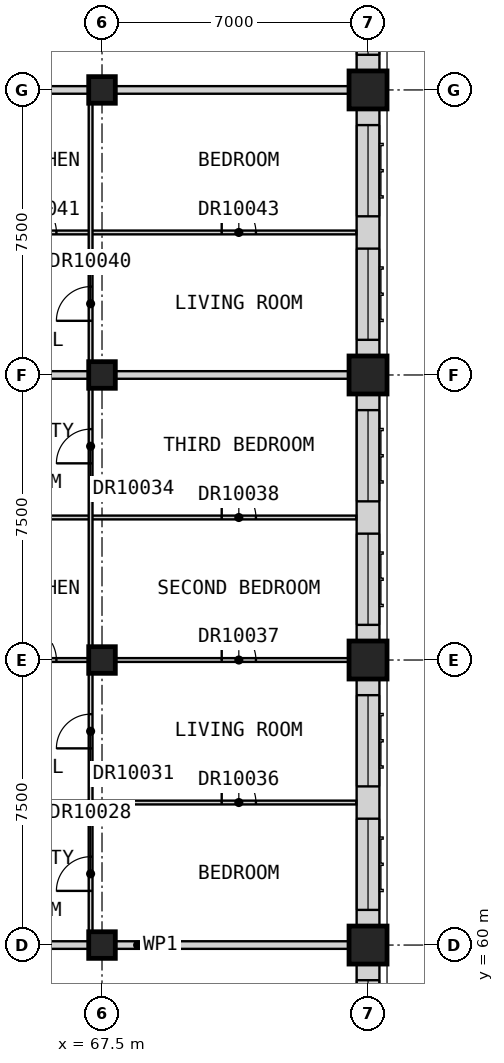
"""IFC4 building model, lengths in metres.
Left out: names, types, materials, properties, quantities, classifications, styles, units other than length and angle.
Written with IfcOpenShell. Run it as: python <this file> out.ifc"""

import sys

from ifc_helpers import new_model, si_unit, direction, frame, frame_2d, origin, origin_2d, place, context, subcontext, project, spatial, rectangle, extrude, element, fill, save


model = new_model("IFC4")
c1 = context("Model", 3, precision=1e-05, world=origin(), true_north=direction((0.0, 1.0)))
c2 = subcontext(c1, "Body", "Model", "MODEL_VIEW")
j1 = project(units=[si_unit("LENGTHUNIT", "METRE"), si_unit("PLANEANGLEUNIT", "RADIAN")], contexts=[c1])
p1 = place(None, origin())
s1 = spatial("IfcSite", under=j1, at=p1, CompositionType="ELEMENT")
p2 = place(p1, origin())
s2 = spatial("IfcBuilding", under=s1, at=p2, CompositionType="ELEMENT")
p3 = place(p2, frame((0.0, 0.0, 273.2)))
s3 = spatial("IfcBuildingStorey", under=s2, at=p3, CompositionType="ELEMENT", Elevation=273.2)
for number, where, z_axis, x_axis in (
    (1, (67.5, 60.0, 0.0), (0.0, 0.0, 1.0), (1.0, 0.0, 0.0)),
    (2, (67.5, 67.5, 0.0), (0.0, 0.0, 1.0), (1.0, 0.0, 0.0)),
    (3, (67.5, 75.0, 0.0), (0.0, 0.0, 1.0), (1.0, 0.0, 0.0)),
    (4, (67.5, 82.5, 0.0), (0.0, 0.0, 1.0), (1.0, 0.0, 0.0)),
):
    element("IfcColumn", number, at=place(p3, frame(where, z_axis=z_axis, x_axis=x_axis)), inside=s3, PredefinedType="COLUMN", context=c2, shape_type="SweptSolid", body=[
        extrude(rectangle(XDim=0.7, YDim=0.7, at=origin_2d()), origin(), (0.0, 0.0, 1.0), 3.5),
    ])
for number, where, z_axis, x_axis in (
    (5, (74.5, 60.0, 0.0), (0.0, 0.0, 1.0), (1.0, 0.0, 0.0)),
    (6, (74.5, 67.5, 0.0), (0.0, 0.0, 1.0), (1.0, 0.0, 0.0)),
    (7, (74.5, 75.0, 0.0), (0.0, 0.0, 1.0), (1.0, 0.0, 0.0)),
    (8, (74.5, 82.5, 0.0), (0.0, 0.0, 1.0), (1.0, 0.0, 0.0)),
):
    element("IfcColumn", number, at=place(p3, frame(where, z_axis=z_axis, x_axis=x_axis)), inside=s3, PredefinedType="COLUMN", context=c2, shape_type="SweptSolid", body=[
        extrude(rectangle(XDim=1.0, YDim=1.0, at=origin_2d()), origin(), (0.0, 0.0, 1.0), 3.5),
    ])
p4 = place(p3, frame((74.5, 53.0, 0.0), z_axis=(0.0, 0.0, 1.0), x_axis=(0.0, 1.0, 0.0)))
e9 = element("IfcWall", 9, at=p4, inside=s3, PredefinedType="SOLIDWALL", context=c2, shape_type="SweptSolid", body=[
    extrude(rectangle(XDim=6.5, YDim=0.6, at=frame_2d((3.25, 0.0))), origin(), (0.0, 0.0, 1.0), 2.75),
])
p5 = place(p4, frame((0.425, 0.0, 0.8)))
e10 = element("IfcOpeningElement", 10, at=p5, cuts=e9, PredefinedType="OPENING", context=c2, shape_type="SweptSolid", body=[
    extrude(rectangle(XDim=2.4, YDim=1.8, at=frame_2d((1.2, 0.9))), frame((0.0, 0.31, 0.0), z_axis=(0.0, -1.0, 0.0), x_axis=(1.0, 0.0, 0.0)), (0.0, 0.0, 1.0), 0.62),
])
p6 = place(p4, frame((3.675, 0.0, 0.8)))
e11 = element("IfcOpeningElement", 11, at=p6, cuts=e9, PredefinedType="OPENING", context=c2, shape_type="SweptSolid", body=[
    extrude(rectangle(XDim=2.4, YDim=1.8, at=frame_2d((1.2, 0.9))), frame((0.0, 0.31, 0.0), z_axis=(0.0, -1.0, 0.0), x_axis=(1.0, 0.0, 0.0)), (0.0, 0.0, 1.0), 0.62),
])
p7 = place(p3, frame((74.5, 60.5, 0.0), z_axis=(0.0, 0.0, 1.0), x_axis=(0.0, 1.0, 0.0)))
e12 = element("IfcWall", 12, at=p7, inside=s3, PredefinedType="SOLIDWALL", context=c2, shape_type="SweptSolid", body=[
    extrude(rectangle(XDim=6.5, YDim=0.6, at=frame_2d((3.25, 0.0))), origin(), (0.0, 0.0, 1.0), 2.75),
])
p8 = place(p7, frame((0.425, 0.0, 0.8)))
e13 = element("IfcOpeningElement", 13, at=p8, cuts=e12, PredefinedType="OPENING", context=c2, shape_type="SweptSolid", body=[
    extrude(rectangle(XDim=2.4, YDim=1.8, at=frame_2d((1.2, 0.9))), frame((0.0, 0.31, 0.0), z_axis=(0.0, -1.0, 0.0), x_axis=(1.0, 0.0, 0.0)), (0.0, 0.0, 1.0), 0.62),
])
p9 = place(p7, frame((3.675, 0.0, 0.8)))
e14 = element("IfcOpeningElement", 14, at=p9, cuts=e12, PredefinedType="OPENING", context=c2, shape_type="SweptSolid", body=[
    extrude(rectangle(XDim=2.4, YDim=1.8, at=frame_2d((1.2, 0.9))), frame((0.0, 0.31, 0.0), z_axis=(0.0, -1.0, 0.0), x_axis=(1.0, 0.0, 0.0)), (0.0, 0.0, 1.0), 0.62),
])
p10 = place(p3, frame((74.5, 68.0, 0.0), z_axis=(0.0, 0.0, 1.0), x_axis=(0.0, 1.0, 0.0)))
e15 = element("IfcWall", 15, at=p10, inside=s3, PredefinedType="SOLIDWALL", context=c2, shape_type="SweptSolid", body=[
    extrude(rectangle(XDim=6.5, YDim=0.6, at=frame_2d((3.25, 0.0))), origin(), (0.0, 0.0, 1.0), 2.75),
])
p11 = place(p10, frame((0.425, 0.0, 0.8)))
e16 = element("IfcOpeningElement", 16, at=p11, cuts=e15, PredefinedType="OPENING", context=c2, shape_type="SweptSolid", body=[
    extrude(rectangle(XDim=2.4, YDim=1.8, at=frame_2d((1.2, 0.9))), frame((0.0, 0.31, 0.0), z_axis=(0.0, -1.0, 0.0), x_axis=(1.0, 0.0, 0.0)), (0.0, 0.0, 1.0), 0.62),
])
p12 = place(p10, frame((3.675, 0.0, 0.8)))
e17 = element("IfcOpeningElement", 17, at=p12, cuts=e15, PredefinedType="OPENING", context=c2, shape_type="SweptSolid", body=[
    extrude(rectangle(XDim=2.4, YDim=1.8, at=frame_2d((1.2, 0.9))), frame((0.0, 0.31, 0.0), z_axis=(0.0, -1.0, 0.0), x_axis=(1.0, 0.0, 0.0)), (0.0, 0.0, 1.0), 0.62),
])
p13 = place(p3, frame((74.5, 75.5, 0.0), z_axis=(0.0, 0.0, 1.0), x_axis=(0.0, 1.0, 0.0)))
e18 = element("IfcWall", 18, at=p13, inside=s3, PredefinedType="SOLIDWALL", context=c2, shape_type="SweptSolid", body=[
    extrude(rectangle(XDim=6.5, YDim=0.6, at=frame_2d((3.25, 0.0))), origin(), (0.0, 0.0, 1.0), 2.75),
])
p14 = place(p13, frame((0.425, 0.0, 0.8)))
e19 = element("IfcOpeningElement", 19, at=p14, cuts=e18, PredefinedType="OPENING", context=c2, shape_type="SweptSolid", body=[
    extrude(rectangle(XDim=2.4, YDim=1.8, at=frame_2d((1.2, 0.9))), frame((0.0, 0.31, 0.0), z_axis=(0.0, -1.0, 0.0), x_axis=(1.0, 0.0, 0.0)), (0.0, 0.0, 1.0), 0.62),
])
p15 = place(p13, frame((3.675, 0.0, 0.8)))
e20 = element("IfcOpeningElement", 20, at=p15, cuts=e18, PredefinedType="OPENING", context=c2, shape_type="SweptSolid", body=[
    extrude(rectangle(XDim=2.4, YDim=1.8, at=frame_2d((1.2, 0.9))), frame((0.0, 0.31, 0.0), z_axis=(0.0, -1.0, 0.0), x_axis=(1.0, 0.0, 0.0)), (0.0, 0.0, 1.0), 0.62),
])
p16 = place(p3, frame((74.5, 83.0, 0.0), z_axis=(0.0, 0.0, 1.0), x_axis=(0.0, 1.0, 0.0)))
e21 = element("IfcWall", 21, at=p16, inside=s3, PredefinedType="SOLIDWALL", context=c2, shape_type="SweptSolid", body=[
    extrude(rectangle(XDim=6.5, YDim=0.6, at=frame_2d((3.25, 0.0))), origin(), (0.0, 0.0, 1.0), 2.75),
])
p17 = place(p16, frame((0.425, 0.0, 0.8)))
e22 = element("IfcOpeningElement", 22, at=p17, cuts=e21, PredefinedType="OPENING", context=c2, shape_type="SweptSolid", body=[
    extrude(rectangle(XDim=2.4, YDim=1.8, at=frame_2d((1.2, 0.9))), frame((0.0, 0.31, 0.0), z_axis=(0.0, -1.0, 0.0), x_axis=(1.0, 0.0, 0.0)), (0.0, 0.0, 1.0), 0.62),
])
p18 = place(p16, frame((3.675, 0.0, 0.8)))
e23 = element("IfcOpeningElement", 23, at=p18, cuts=e21, PredefinedType="OPENING", context=c2, shape_type="SweptSolid", body=[
    extrude(rectangle(XDim=2.4, YDim=1.8, at=frame_2d((1.2, 0.9))), frame((0.0, 0.31, 0.0), z_axis=(0.0, -1.0, 0.0), x_axis=(1.0, 0.0, 0.0)), (0.0, 0.0, 1.0), 0.62),
])
for number, where, z_axis, x_axis in (
    (24, (61.875, 60.0, 0.0), (0.0, 0.0, 1.0), (1.0, 0.0, 0.0)),
    (25, (61.875, 75.0, 0.0), (0.0, 0.0, 1.0), (1.0, 0.0, 0.0)),
    (26, (61.875, 82.5, 0.0), (0.0, 0.0, 1.0), (1.0, 0.0, 0.0)),
):
    element("IfcWall", number, at=place(p3, frame(where, z_axis=z_axis, x_axis=x_axis)), inside=s3, PredefinedType="PARTITIONING", context=c2, shape_type="SweptSolid", body=[
        extrude(rectangle(XDim=13.125, YDim=0.2, at=frame_2d((6.562, 0.0))), origin(), (0.0, 0.0, 1.0), 3.25),
    ])
p19 = place(p3, frame((64.562, 63.75, 0.0), z_axis=(0.0, 0.0, 1.0), x_axis=(1.0, 0.0, 0.0)))
e27 = element("IfcWall", 27, at=p19, inside=s3, PredefinedType="PARTITIONING", context=c2, shape_type="SweptSolid", body=[
    extrude(rectangle(XDim=9.627, YDim=0.1, at=frame_2d((4.814, 0.0))), origin(), (0.0, 0.0, 1.0), 3.25),
])
p20 = place(p19, frame((6.087, 0.0, 0.0)))
e28 = element("IfcOpeningElement", 28, at=p20, cuts=e27, PredefinedType="OPENING", context=c2, shape_type="SweptSolid", body=[
    extrude(rectangle(XDim=0.9, YDim=2.1, at=frame_2d((0.45, 1.05))), frame((0.0, 0.06, 0.0), z_axis=(0.0, -1.0, 0.0), x_axis=(1.0, 0.0, 0.0)), (0.0, 0.0, 1.0), 0.12),
])
p21 = place(p3, frame((64.562, 67.5, 0.0), z_axis=(0.0, 0.0, 1.0), x_axis=(1.0, 0.0, 0.0)))
e29 = element("IfcWall", 29, at=p21, inside=s3, PredefinedType="PARTITIONING", context=c2, shape_type="SweptSolid", body=[
    extrude(rectangle(XDim=10.438, YDim=0.1, at=frame_2d((5.219, 0.0))), origin(), (0.0, 0.0, 1.0), 3.25),
])
p22 = place(p21, frame((0.837, 0.0, 0.0)))
e30 = element("IfcOpeningElement", 30, at=p22, cuts=e29, PredefinedType="OPENING", context=c2, shape_type="SweptSolid", body=[
    extrude(rectangle(XDim=0.9, YDim=2.1, at=frame_2d((0.45, 1.05))), frame((0.0, 0.06, 0.0), z_axis=(0.0, -1.0, 0.0), x_axis=(1.0, 0.0, 0.0)), (0.0, 0.0, 1.0), 0.12),
])
p23 = place(p21, frame((6.087, 0.0, 0.0)))
e31 = element("IfcOpeningElement", 31, at=p23, cuts=e29, PredefinedType="OPENING", context=c2, shape_type="SweptSolid", body=[
    extrude(rectangle(XDim=0.9, YDim=2.1, at=frame_2d((0.45, 1.05))), frame((0.0, 0.06, 0.0), z_axis=(0.0, -1.0, 0.0), x_axis=(1.0, 0.0, 0.0)), (0.0, 0.0, 1.0), 0.12),
])
p24 = place(p3, frame((64.562, 71.25, 0.0), z_axis=(0.0, 0.0, 1.0), x_axis=(1.0, 0.0, 0.0)))
e32 = element("IfcWall", 32, at=p24, inside=s3, PredefinedType="PARTITIONING", context=c2, shape_type="SweptSolid", body=[
    extrude(rectangle(XDim=9.627, YDim=0.1, at=frame_2d((4.814, 0.0))), origin(), (0.0, 0.0, 1.0), 3.25),
])
p25 = place(p24, frame((6.087, 0.0, 0.0)))
e33 = element("IfcOpeningElement", 33, at=p25, cuts=e32, PredefinedType="OPENING", context=c2, shape_type="SweptSolid", body=[
    extrude(rectangle(XDim=0.9, YDim=2.1, at=frame_2d((0.45, 1.05))), frame((0.0, 0.06, 0.0), z_axis=(0.0, -1.0, 0.0), x_axis=(1.0, 0.0, 0.0)), (0.0, 0.0, 1.0), 0.12),
])
p26 = place(p3, frame((64.562, 78.75, 0.0), z_axis=(0.0, 0.0, 1.0), x_axis=(1.0, 0.0, 0.0)))
e34 = element("IfcWall", 34, at=p26, inside=s3, PredefinedType="PARTITIONING", context=c2, shape_type="SweptSolid", body=[
    extrude(rectangle(XDim=9.627, YDim=0.1, at=frame_2d((4.814, 0.0))), origin(), (0.0, 0.0, 1.0), 3.25),
])
p27 = place(p26, frame((0.837, 0.0, 0.0)))
e35 = element("IfcOpeningElement", 35, at=p27, cuts=e34, PredefinedType="OPENING", context=c2, shape_type="SweptSolid", body=[
    extrude(rectangle(XDim=0.9, YDim=2.1, at=frame_2d((0.45, 1.05))), frame((0.0, 0.06, 0.0), z_axis=(0.0, -1.0, 0.0), x_axis=(1.0, 0.0, 0.0)), (0.0, 0.0, 1.0), 0.12),
])
p28 = place(p26, frame((6.087, 0.0, 0.0)))
e36 = element("IfcOpeningElement", 36, at=p28, cuts=e34, PredefinedType="OPENING", context=c2, shape_type="SweptSolid", body=[
    extrude(rectangle(XDim=0.9, YDim=2.1, at=frame_2d((0.45, 1.05))), frame((0.0, 0.06, 0.0), z_axis=(0.0, -1.0, 0.0), x_axis=(1.0, 0.0, 0.0)), (0.0, 0.0, 1.0), 0.12),
])
p29 = place(p3, frame((67.2, 60.1, 0.0), z_axis=(0.0, 0.0, 1.0), x_axis=(0.0, 1.0, 0.0)))
e37 = element("IfcWall", 37, at=p29, inside=s3, PredefinedType="PARTITIONING", context=c2, shape_type="SweptSolid", body=[
    extrude(rectangle(XDim=22.3, YDim=0.1, at=frame_2d((11.15, 0.0))), origin(), (0.0, 0.0, 1.0), 3.25),
])
p30 = place(p29, frame((1.325, 0.0, 0.0)))
e38 = element("IfcOpeningElement", 38, at=p30, cuts=e37, PredefinedType="OPENING", context=c2, shape_type="SweptSolid", body=[
    extrude(rectangle(XDim=0.9, YDim=2.1, at=frame_2d((0.45, 1.05))), frame((0.0, 0.06, 0.0), z_axis=(0.0, -1.0, 0.0), x_axis=(1.0, 0.0, 0.0)), (0.0, 0.0, 1.0), 0.12),
])
p31 = place(p29, frame((5.075, 0.0, 0.0)))
e39 = element("IfcOpeningElement", 39, at=p31, cuts=e37, PredefinedType="OPENING", context=c2, shape_type="SweptSolid", body=[
    extrude(rectangle(XDim=0.9, YDim=2.1, at=frame_2d((0.45, 1.05))), frame((0.0, 0.06, 0.0), z_axis=(0.0, -1.0, 0.0), x_axis=(1.0, 0.0, 0.0)), (0.0, 0.0, 1.0), 0.12),
])
p32 = place(p29, frame((12.575, 0.0, 0.0)))
e40 = element("IfcOpeningElement", 40, at=p32, cuts=e37, PredefinedType="OPENING", context=c2, shape_type="SweptSolid", body=[
    extrude(rectangle(XDim=0.9, YDim=2.1, at=frame_2d((0.45, 1.05))), frame((0.0, 0.06, 0.0), z_axis=(0.0, -1.0, 0.0), x_axis=(1.0, 0.0, 0.0)), (0.0, 0.0, 1.0), 0.12),
])
p33 = place(p29, frame((16.325, 0.0, 0.0)))
e41 = element("IfcOpeningElement", 41, at=p33, cuts=e37, PredefinedType="OPENING", context=c2, shape_type="SweptSolid", body=[
    extrude(rectangle(XDim=0.9, YDim=2.1, at=frame_2d((0.45, 1.05))), frame((0.0, 0.06, 0.0), z_axis=(0.0, -1.0, 0.0), x_axis=(1.0, 0.0, 0.0)), (0.0, 0.0, 1.0), 0.12),
])
p34 = place(p6, origin())
e42 = element("IfcWindow", 42, at=p34, inside=s3, PartitioningType="SINGLE_PANEL", PredefinedType="WINDOW", context=c2, shape_type="SweptSolid", body=[
    extrude(rectangle(XDim=2.4, YDim=1.8, at=frame_2d((1.2, 0.9))), frame((0.0, -0.07, 0.0), z_axis=(0.0, -1.0, 0.0), x_axis=(1.0, 0.0, 0.0)), (0.0, 0.0, 1.0), 0.06),
])
fill(e11, e42)
p35 = place(p8, origin())
e43 = element("IfcWindow", 43, at=p35, inside=s3, PartitioningType="SINGLE_PANEL", PredefinedType="WINDOW", context=c2, shape_type="SweptSolid", body=[
    extrude(rectangle(XDim=2.4, YDim=1.8, at=frame_2d((1.2, 0.9))), frame((0.0, -0.07, 0.0), z_axis=(0.0, -1.0, 0.0), x_axis=(1.0, 0.0, 0.0)), (0.0, 0.0, 1.0), 0.06),
])
fill(e13, e43)
p36 = place(p9, origin())
e44 = element("IfcWindow", 44, at=p36, inside=s3, PartitioningType="SINGLE_PANEL", PredefinedType="WINDOW", context=c2, shape_type="SweptSolid", body=[
    extrude(rectangle(XDim=2.4, YDim=1.8, at=frame_2d((1.2, 0.9))), frame((0.0, -0.07, 0.0), z_axis=(0.0, -1.0, 0.0), x_axis=(1.0, 0.0, 0.0)), (0.0, 0.0, 1.0), 0.06),
])
fill(e14, e44)
p37 = place(p11, origin())
e45 = element("IfcWindow", 45, at=p37, inside=s3, PartitioningType="SINGLE_PANEL", PredefinedType="WINDOW", context=c2, shape_type="SweptSolid", body=[
    extrude(rectangle(XDim=2.4, YDim=1.8, at=frame_2d((1.2, 0.9))), frame((0.0, -0.07, 0.0), z_axis=(0.0, -1.0, 0.0), x_axis=(1.0, 0.0, 0.0)), (0.0, 0.0, 1.0), 0.06),
])
fill(e16, e45)
p38 = place(p12, origin())
e46 = element("IfcWindow", 46, at=p38, inside=s3, PartitioningType="SINGLE_PANEL", PredefinedType="WINDOW", context=c2, shape_type="SweptSolid", body=[
    extrude(rectangle(XDim=2.4, YDim=1.8, at=frame_2d((1.2, 0.9))), frame((0.0, -0.07, 0.0), z_axis=(0.0, -1.0, 0.0), x_axis=(1.0, 0.0, 0.0)), (0.0, 0.0, 1.0), 0.06),
])
fill(e17, e46)
p39 = place(p14, origin())
e47 = element("IfcWindow", 47, at=p39, inside=s3, PartitioningType="SINGLE_PANEL", PredefinedType="WINDOW", context=c2, shape_type="SweptSolid", body=[
    extrude(rectangle(XDim=2.4, YDim=1.8, at=frame_2d((1.2, 0.9))), frame((0.0, -0.07, 0.0), z_axis=(0.0, -1.0, 0.0), x_axis=(1.0, 0.0, 0.0)), (0.0, 0.0, 1.0), 0.06),
])
fill(e19, e47)
p40 = place(p15, origin())
e48 = element("IfcWindow", 48, at=p40, inside=s3, PartitioningType="SINGLE_PANEL", PredefinedType="WINDOW", context=c2, shape_type="SweptSolid", body=[
    extrude(rectangle(XDim=2.4, YDim=1.8, at=frame_2d((1.2, 0.9))), frame((0.0, -0.07, 0.0), z_axis=(0.0, -1.0, 0.0), x_axis=(1.0, 0.0, 0.0)), (0.0, 0.0, 1.0), 0.06),
])
fill(e20, e48)
p41 = place(p17, origin())
e49 = element("IfcWindow", 49, at=p41, inside=s3, PartitioningType="SINGLE_PANEL", PredefinedType="WINDOW", context=c2, shape_type="SweptSolid", body=[
    extrude(rectangle(XDim=2.4, YDim=1.8, at=frame_2d((1.2, 0.9))), frame((0.0, -0.07, 0.0), z_axis=(0.0, -1.0, 0.0), x_axis=(1.0, 0.0, 0.0)), (0.0, 0.0, 1.0), 0.06),
])
fill(e22, e49)
p42 = place(p30, origin())
e50 = element("IfcDoor", 50, at=p42, inside=s3, OperationType="SINGLE_SWING_LEFT", PredefinedType="DOOR", context=c2, shape_type="SweptSolid", body=[
    extrude(rectangle(XDim=0.9, YDim=2.1, at=frame_2d((0.45, 1.05))), frame((0.0, 0.025, 0.0), z_axis=(0.0, -1.0, 0.0), x_axis=(1.0, 0.0, 0.0)), (0.0, 0.0, 1.0), 0.05),
])
fill(e38, e50)
p43 = place(p31, origin())
e51 = element("IfcDoor", 51, at=p43, inside=s3, OperationType="SINGLE_SWING_LEFT", PredefinedType="DOOR", context=c2, shape_type="SweptSolid", body=[
    extrude(rectangle(XDim=0.9, YDim=2.1, at=frame_2d((0.45, 1.05))), frame((0.0, 0.025, 0.0), z_axis=(0.0, -1.0, 0.0), x_axis=(1.0, 0.0, 0.0)), (0.0, 0.0, 1.0), 0.05),
])
fill(e39, e51)
p44 = place(p22, origin())
e52 = element("IfcDoor", 52, at=p44, inside=s3, OperationType="SINGLE_SWING_LEFT", PredefinedType="DOOR", context=c2, shape_type="SweptSolid", body=[
    extrude(rectangle(XDim=0.9, YDim=2.1, at=frame_2d((0.45, 1.05))), frame((0.0, 0.025, 0.0), z_axis=(0.0, -1.0, 0.0), x_axis=(1.0, 0.0, 0.0)), (0.0, 0.0, 1.0), 0.05),
])
fill(e30, e52)
p45 = place(p32, origin())
e53 = element("IfcDoor", 53, at=p45, inside=s3, OperationType="SINGLE_SWING_LEFT", PredefinedType="DOOR", context=c2, shape_type="SweptSolid", body=[
    extrude(rectangle(XDim=0.9, YDim=2.1, at=frame_2d((0.45, 1.05))), frame((0.0, 0.025, 0.0), z_axis=(0.0, -1.0, 0.0), x_axis=(1.0, 0.0, 0.0)), (0.0, 0.0, 1.0), 0.05),
])
fill(e40, e53)
p46 = place(p20, origin())
e54 = element("IfcDoor", 54, at=p46, inside=s3, OperationType="SINGLE_SWING_RIGHT", PredefinedType="DOOR", context=c2, shape_type="SweptSolid", body=[
    extrude(rectangle(XDim=0.9, YDim=2.1, at=frame_2d((0.45, 1.05))), frame((0.0, 0.025, 0.0), z_axis=(0.0, -1.0, 0.0), x_axis=(1.0, 0.0, 0.0)), (0.0, 0.0, 1.0), 0.05),
])
fill(e28, e54)
p47 = place(p23, origin())
e55 = element("IfcDoor", 55, at=p47, inside=s3, OperationType="SINGLE_SWING_RIGHT", PredefinedType="DOOR", context=c2, shape_type="SweptSolid", body=[
    extrude(rectangle(XDim=0.9, YDim=2.1, at=frame_2d((0.45, 1.05))), frame((0.0, 0.025, 0.0), z_axis=(0.0, -1.0, 0.0), x_axis=(1.0, 0.0, 0.0)), (0.0, 0.0, 1.0), 0.05),
])
fill(e31, e55)
p48 = place(p25, origin())
e56 = element("IfcDoor", 56, at=p48, inside=s3, OperationType="SINGLE_SWING_RIGHT", PredefinedType="DOOR", context=c2, shape_type="SweptSolid", body=[
    extrude(rectangle(XDim=0.9, YDim=2.1, at=frame_2d((0.45, 1.05))), frame((0.0, 0.025, 0.0), z_axis=(0.0, -1.0, 0.0), x_axis=(1.0, 0.0, 0.0)), (0.0, 0.0, 1.0), 0.05),
])
fill(e33, e56)
p49 = place(p33, origin())
e57 = element("IfcDoor", 57, at=p49, inside=s3, OperationType="SINGLE_SWING_LEFT", PredefinedType="DOOR", context=c2, shape_type="SweptSolid", body=[
    extrude(rectangle(XDim=0.9, YDim=2.1, at=frame_2d((0.45, 1.05))), frame((0.0, 0.025, 0.0), z_axis=(0.0, -1.0, 0.0), x_axis=(1.0, 0.0, 0.0)), (0.0, 0.0, 1.0), 0.05),
])
fill(e41, e57)
p50 = place(p27, origin())
e58 = element("IfcDoor", 58, at=p50, inside=s3, OperationType="SINGLE_SWING_LEFT", PredefinedType="DOOR", context=c2, shape_type="SweptSolid", body=[
    extrude(rectangle(XDim=0.9, YDim=2.1, at=frame_2d((0.45, 1.05))), frame((0.0, 0.025, 0.0), z_axis=(0.0, -1.0, 0.0), x_axis=(1.0, 0.0, 0.0)), (0.0, 0.0, 1.0), 0.05),
])
fill(e35, e58)
p51 = place(p28, origin())
e59 = element("IfcDoor", 59, at=p51, inside=s3, OperationType="SINGLE_SWING_RIGHT", PredefinedType="DOOR", context=c2, shape_type="SweptSolid", body=[
    extrude(rectangle(XDim=0.9, YDim=2.1, at=frame_2d((0.45, 1.05))), frame((0.0, 0.025, 0.0), z_axis=(0.0, -1.0, 0.0), x_axis=(1.0, 0.0, 0.0)), (0.0, 0.0, 1.0), 0.05),
])
fill(e36, e59)
save(model, sys.argv[1])
